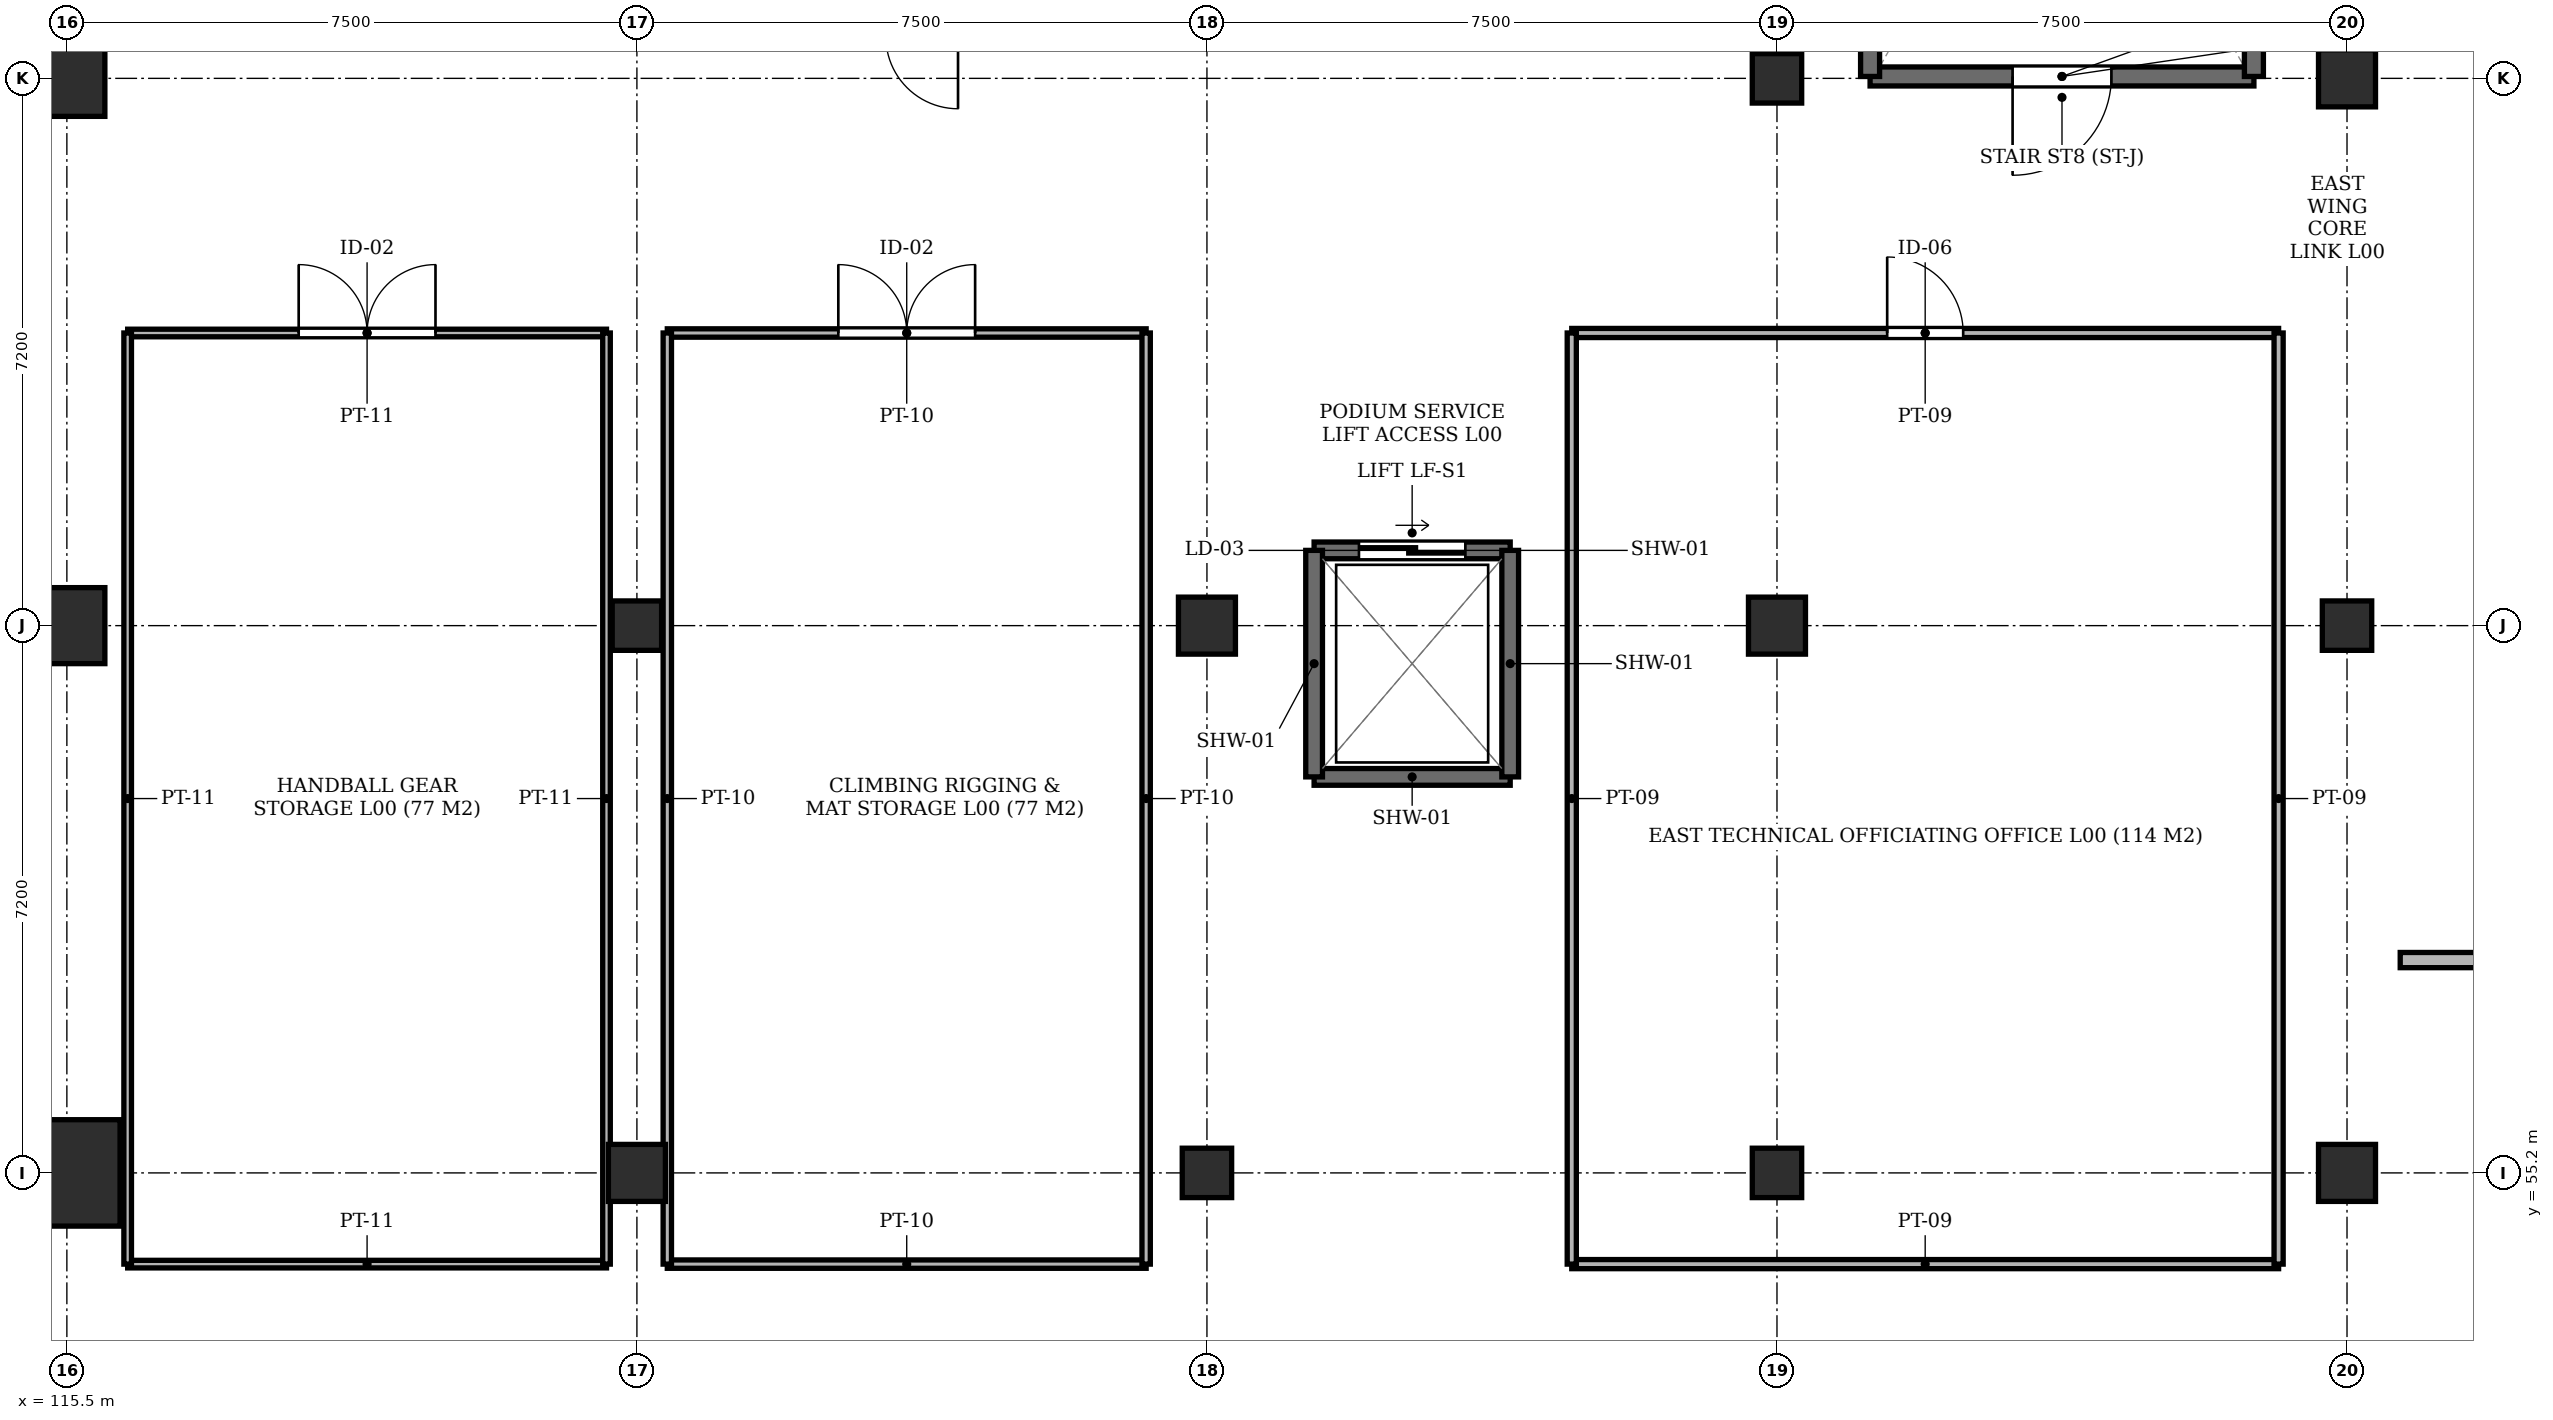
"""IFC4 building model, lengths in metres.
Left out: names, types, materials, properties, quantities, classifications, styles, units other than length and angle.
Written with IfcOpenShell. Run it as: python <this file> out.ifc"""

import sys

from ifc_helpers import new_model, si_unit, direction, frame, frame_2d, origin, origin_2d, place, context, subcontext, project, spatial, rectangle, extrude, element, fill, save


model = new_model("IFC4")
c1 = context("Model", 3, precision=1e-05, world=origin(), true_north=direction((0.0, 1.0)))
c2 = subcontext(c1, "Body", "Model", "MODEL_VIEW")
j1 = project(units=[si_unit("LENGTHUNIT", "METRE"), si_unit("PLANEANGLEUNIT", "RADIAN")], contexts=[c1])
p1 = place(None, origin())
s1 = spatial("IfcSite", under=j1, at=p1, CompositionType="ELEMENT")
p2 = place(p1, origin())
s2 = spatial("IfcBuilding", under=s1, at=p2, CompositionType="ELEMENT")
p3 = place(p2, origin())
s3 = spatial("IfcBuildingStorey", under=s2, at=p3, CompositionType="ELEMENT", Elevation=0.0)
p4 = place(p3, frame((115.5, 55.2, -0.35), z_axis=(0.0, 0.0, 1.0), x_axis=(1.0, 0.0, 0.0)))
e1 = element("IfcColumn", 1, at=p4, inside=s3, PredefinedType="COLUMN", context=c2, shape_type="SweptSolid", body=[
    extrude(rectangle(XDim=1.4, YDim=1.4, at=origin_2d()), origin(), (0.0, 0.0, 1.0), 4.65),
])
for number, where, z_axis, x_axis in (
    (2, (115.5, 62.4, -0.35), (0.0, 0.0, 1.0), (1.0, 0.0, 0.0)),
    (3, (115.5, 69.6, -0.35), (0.0, 0.0, 1.0), (1.0, 0.0, 0.0)),
):
    element("IfcColumn", number, at=place(p3, frame(where, z_axis=z_axis, x_axis=x_axis)), inside=s3, PredefinedType="COLUMN", context=c2, shape_type="SweptSolid", body=[
        extrude(rectangle(XDim=1.0, YDim=1.0, at=origin_2d()), origin(), (0.0, 0.0, 1.0), 4.65),
    ])
p5 = place(p3, frame((123.0, 55.2, -0.35), z_axis=(0.0, 0.0, 1.0), x_axis=(1.0, 0.0, 0.0)))
e4 = element("IfcColumn", 4, at=p5, inside=s3, PredefinedType="COLUMN", context=c2, shape_type="SweptSolid", body=[
    extrude(rectangle(XDim=0.75, YDim=0.75, at=origin_2d()), origin(), (0.0, 0.0, 1.0), 4.65),
])
for number, where, z_axis, x_axis in (
    (5, (123.0, 62.4, -0.35), (0.0, 0.0, 1.0), (1.0, 0.0, 0.0)),
    (6, (130.5, 55.2, -0.35), (0.0, 0.0, 1.0), (1.0, 0.0, 0.0)),
):
    element("IfcColumn", number, at=place(p3, frame(where, z_axis=z_axis, x_axis=x_axis)), inside=s3, PredefinedType="COLUMN", context=c2, shape_type="SweptSolid", body=[
        extrude(rectangle(XDim=0.65, YDim=0.65, at=origin_2d()), origin(), (0.0, 0.0, 1.0), 4.65),
    ])
p6 = place(p3, frame((130.5, 62.4, -0.35), z_axis=(0.0, 0.0, 1.0), x_axis=(1.0, 0.0, 0.0)))
e7 = element("IfcColumn", 7, at=p6, inside=s3, PredefinedType="COLUMN", context=c2, shape_type="SweptSolid", body=[
    extrude(rectangle(XDim=0.75, YDim=0.75, at=origin_2d()), origin(), (0.0, 0.0, 1.0), 4.65),
])
p7 = place(p3, frame((138.0, 55.2, -0.35), z_axis=(0.0, 0.0, 1.0), x_axis=(1.0, 0.0, 0.0)))
e8 = element("IfcColumn", 8, at=p7, inside=s3, PredefinedType="COLUMN", context=c2, shape_type="SweptSolid", body=[
    extrude(rectangle(XDim=0.65, YDim=0.65, at=origin_2d()), origin(), (0.0, 0.0, 1.0), 4.65),
])
p8 = place(p3, frame((138.0, 62.4, -0.35), z_axis=(0.0, 0.0, 1.0), x_axis=(1.0, 0.0, 0.0)))
e9 = element("IfcColumn", 9, at=p8, inside=s3, PredefinedType="COLUMN", context=c2, shape_type="SweptSolid", body=[
    extrude(rectangle(XDim=0.75, YDim=0.75, at=origin_2d()), origin(), (0.0, 0.0, 1.0), 4.65),
])
p9 = place(p3, frame((138.0, 69.6, -0.35), z_axis=(0.0, 0.0, 1.0), x_axis=(1.0, 0.0, 0.0)))
e10 = element("IfcColumn", 10, at=p9, inside=s3, PredefinedType="COLUMN", context=c2, shape_type="SweptSolid", body=[
    extrude(rectangle(XDim=0.65, YDim=0.65, at=origin_2d()), origin(), (0.0, 0.0, 1.0), 4.65),
])
p10 = place(p3, frame((145.5, 55.2, -0.35), z_axis=(0.0, 0.0, 1.0), x_axis=(1.0, 0.0, 0.0)))
e11 = element("IfcColumn", 11, at=p10, inside=s3, PredefinedType="COLUMN", context=c2, shape_type="SweptSolid", body=[
    extrude(rectangle(XDim=0.75, YDim=0.75, at=origin_2d()), origin(), (0.0, 0.0, 1.0), 4.65),
])
p11 = place(p3, frame((145.5, 62.4, -0.35), z_axis=(0.0, 0.0, 1.0), x_axis=(1.0, 0.0, 0.0)))
e12 = element("IfcColumn", 12, at=p11, inside=s3, PredefinedType="COLUMN", context=c2, shape_type="SweptSolid", body=[
    extrude(rectangle(XDim=0.65, YDim=0.65, at=origin_2d()), origin(), (0.0, 0.0, 1.0), 4.65),
])
p12 = place(p3, frame((145.5, 69.6, -0.35), z_axis=(0.0, 0.0, 1.0), x_axis=(1.0, 0.0, 0.0)))
e13 = element("IfcColumn", 13, at=p12, inside=s3, PredefinedType="COLUMN", context=c2, shape_type="SweptSolid", body=[
    extrude(rectangle(XDim=0.75, YDim=0.75, at=origin_2d()), origin(), (0.0, 0.0, 1.0), 4.65),
])
p13 = place(p3, frame((139.225, 69.625, 0.0), z_axis=(0.0, 0.0, 1.0), x_axis=(1.0, 0.0, 0.0)))
e14 = element("IfcWall", 14, at=p13, inside=s3, PredefinedType="SHEAR", context=c2, shape_type="SweptSolid", body=[
    extrude(rectangle(XDim=5.05, YDim=0.25, at=frame_2d((2.525, 0.0))), origin(), (0.0, 0.0, 1.0), 4.3),
])
p14 = place(p13, frame((1.875, 0.0, 0.0)))
e15 = element("IfcOpeningElement", 15, at=p14, cuts=e14, PredefinedType="OPENING", context=c2, shape_type="SweptSolid", body=[
    extrude(rectangle(XDim=1.3, YDim=2.2, at=frame_2d((0.65, 1.1))), frame((0.0, 0.137, 0.0), z_axis=(0.0, -1.0, 0.0), x_axis=(1.0, 0.0, 0.0)), (0.0, 0.0, 1.0), 0.274),
])
for number, where, z_axis, x_axis in (
    (16, (139.225, 78.325, 0.0), (0.0, 0.0, 1.0), (0.0, -1.0, 0.0)),
    (17, (144.275, 69.625, 0.0), (0.0, 0.0, 1.0), (0.0, 1.0, 0.0)),
):
    element("IfcWall", number, at=place(p3, frame(where, z_axis=z_axis, x_axis=x_axis)), inside=s3, PredefinedType="SHEAR", context=c2, shape_type="SweptSolid", body=[
        extrude(rectangle(XDim=8.7, YDim=0.25, at=frame_2d((4.35, 0.0))), origin(), (0.0, 0.0, 1.0), 4.3),
    ])
p15 = place(p3, frame((131.91, 60.41, 0.0), z_axis=(0.0, 0.0, 1.0), x_axis=(1.0, 0.0, 0.0)))
e18 = element("IfcWall", 18, at=p15, inside=s3, PredefinedType="SHEAR", context=c2, shape_type="SweptSolid", body=[
    extrude(rectangle(XDim=2.58, YDim=0.22, at=frame_2d((1.29, 0.0))), origin(), (0.0, 0.0, 1.0), 4.3),
])
p16 = place(p3, frame((134.49, 63.39, 0.0), z_axis=(0.0, 0.0, 1.0), x_axis=(-1.0, 0.0, 0.0)))
e19 = element("IfcWall", 19, at=p16, inside=s3, PredefinedType="SHEAR", context=c2, shape_type="SweptSolid", body=[
    extrude(rectangle(XDim=2.58, YDim=0.22, at=frame_2d((1.29, 0.0))), origin(), (0.0, 0.0, 1.0), 4.3),
])
p17 = place(p16, frame((0.59, 0.0, 0.0)))
e20 = element("IfcOpeningElement", 20, at=p17, cuts=e19, PredefinedType="OPENING", context=c2, shape_type="SweptSolid", body=[
    extrude(rectangle(XDim=1.4, YDim=2.3, at=frame_2d((0.7, 1.15))), frame((0.0, 0.122, 0.0), z_axis=(0.0, -1.0, 0.0), x_axis=(1.0, 0.0, 0.0)), (0.0, 0.0, 1.0), 0.244),
])
for number, where, z_axis, x_axis in (
    (21, (131.91, 63.39, 0.0), (0.0, 0.0, 1.0), (0.0, -1.0, 0.0)),
    (22, (134.49, 60.41, 0.0), (0.0, 0.0, 1.0), (0.0, 1.0, 0.0)),
):
    element("IfcWall", number, at=place(p3, frame(where, z_axis=z_axis, x_axis=x_axis)), inside=s3, PredefinedType="SHEAR", context=c2, shape_type="SweptSolid", body=[
        extrude(rectangle(XDim=2.98, YDim=0.22, at=frame_2d((1.49, 0.0))), origin(), (0.0, 0.0, 1.0), 4.3),
    ])
p18 = place(p3, frame((116.3, 54.0, 0.0), z_axis=(0.0, 0.0, 1.0), x_axis=(1.0, 0.0, 0.0)))
e23 = element("IfcWall", 23, at=p18, inside=s3, PredefinedType="PARTITIONING", context=c2, shape_type="SweptSolid", body=[
    extrude(rectangle(XDim=6.3, YDim=0.1, at=frame_2d((3.15, 0.0))), origin(), (0.0, 0.0, 1.0), 3.88),
])
p19 = place(p3, frame((116.3, 66.25, 0.0), z_axis=(0.0, 0.0, 1.0), x_axis=(1.0, 0.0, 0.0)))
e24 = element("IfcWall", 24, at=p19, inside=s3, PredefinedType="PARTITIONING", context=c2, shape_type="SweptSolid", body=[
    extrude(rectangle(XDim=6.3, YDim=0.1, at=frame_2d((3.15, 0.0))), origin(), (0.0, 0.0, 1.0), 3.88),
])
p20 = place(p19, frame((2.25, 0.0, 0.0)))
e25 = element("IfcOpeningElement", 25, at=p20, cuts=e24, PredefinedType="OPENING", context=c2, shape_type="SweptSolid", body=[
    extrude(rectangle(XDim=1.8, YDim=2.25, at=frame_2d((0.9, 1.125))), frame((0.0, 0.062, 0.0), z_axis=(0.0, -1.0, 0.0), x_axis=(1.0, 0.0, 0.0)), (0.0, 0.0, 1.0), 0.124),
])
for number, where, z_axis, x_axis in (
    (26, (116.3, 54.0, 0.0), (0.0, 0.0, 1.0), (0.0, 1.0, 0.0)),
    (27, (122.6, 54.0, 0.0), (0.0, 0.0, 1.0), (0.0, 1.0, 0.0)),
):
    element("IfcWall", number, at=place(p3, frame(where, z_axis=z_axis, x_axis=x_axis)), inside=s3, PredefinedType="PARTITIONING", context=c2, shape_type="SweptSolid", body=[
        extrude(rectangle(XDim=12.25, YDim=0.1, at=frame_2d((6.125, 0.0))), origin(), (0.0, 0.0, 1.0), 3.88),
    ])
p21 = place(p3, frame((123.4, 54.0, 0.0), z_axis=(0.0, 0.0, 1.0), x_axis=(1.0, 0.0, 0.0)))
e28 = element("IfcWall", 28, at=p21, inside=s3, PredefinedType="PARTITIONING", context=c2, shape_type="SweptSolid", body=[
    extrude(rectangle(XDim=6.3, YDim=0.11, at=frame_2d((3.15, 0.0))), origin(), (0.0, 0.0, 1.0), 3.88),
])
p22 = place(p3, frame((123.4, 66.25, 0.0), z_axis=(0.0, 0.0, 1.0), x_axis=(1.0, 0.0, 0.0)))
e29 = element("IfcWall", 29, at=p22, inside=s3, PredefinedType="PARTITIONING", context=c2, shape_type="SweptSolid", body=[
    extrude(rectangle(XDim=6.3, YDim=0.11, at=frame_2d((3.15, 0.0))), origin(), (0.0, 0.0, 1.0), 3.88),
])
p23 = place(p22, frame((2.25, 0.0, 0.0)))
e30 = element("IfcOpeningElement", 30, at=p23, cuts=e29, PredefinedType="OPENING", context=c2, shape_type="SweptSolid", body=[
    extrude(rectangle(XDim=1.8, YDim=2.25, at=frame_2d((0.9, 1.125))), frame((0.0, 0.067, 0.0), z_axis=(0.0, -1.0, 0.0), x_axis=(1.0, 0.0, 0.0)), (0.0, 0.0, 1.0), 0.134),
])
for number, where, z_axis, x_axis in (
    (31, (123.4, 54.0, 0.0), (0.0, 0.0, 1.0), (0.0, 1.0, 0.0)),
    (32, (129.7, 54.0, 0.0), (0.0, 0.0, 1.0), (0.0, 1.0, 0.0)),
):
    element("IfcWall", number, at=place(p3, frame(where, z_axis=z_axis, x_axis=x_axis)), inside=s3, PredefinedType="PARTITIONING", context=c2, shape_type="SweptSolid", body=[
        extrude(rectangle(XDim=12.25, YDim=0.11, at=frame_2d((6.125, 0.0))), origin(), (0.0, 0.0, 1.0), 3.88),
    ])
p24 = place(p3, frame((135.3, 54.0, 0.0), z_axis=(0.0, 0.0, 1.0), x_axis=(1.0, 0.0, 0.0)))
e33 = element("IfcWall", 33, at=p24, inside=s3, PredefinedType="PARTITIONING", context=c2, shape_type="SweptSolid", body=[
    extrude(rectangle(XDim=9.3, YDim=0.12, at=frame_2d((4.65, 0.0))), origin(), (0.0, 0.0, 1.0), 3.88),
])
p25 = place(p3, frame((135.3, 66.25, 0.0), z_axis=(0.0, 0.0, 1.0), x_axis=(1.0, 0.0, 0.0)))
e34 = element("IfcWall", 34, at=p25, inside=s3, PredefinedType="PARTITIONING", context=c2, shape_type="SweptSolid", body=[
    extrude(rectangle(XDim=9.3, YDim=0.12, at=frame_2d((4.65, 0.0))), origin(), (0.0, 0.0, 1.0), 3.88),
])
p26 = place(p25, frame((4.15, 0.0, 0.0)))
e35 = element("IfcOpeningElement", 35, at=p26, cuts=e34, PredefinedType="OPENING", context=c2, shape_type="SweptSolid", body=[
    extrude(rectangle(XDim=1.0, YDim=2.15, at=frame_2d((0.5, 1.075))), frame((0.0, 0.072, 0.0), z_axis=(0.0, -1.0, 0.0), x_axis=(1.0, 0.0, 0.0)), (0.0, 0.0, 1.0), 0.144),
])
for number, where, z_axis, x_axis in (
    (36, (135.3, 54.0, 0.0), (0.0, 0.0, 1.0), (0.0, 1.0, 0.0)),
    (37, (144.6, 54.0, 0.0), (0.0, 0.0, 1.0), (0.0, 1.0, 0.0)),
):
    element("IfcWall", number, at=place(p3, frame(where, z_axis=z_axis, x_axis=x_axis)), inside=s3, PredefinedType="PARTITIONING", context=c2, shape_type="SweptSolid", body=[
        extrude(rectangle(XDim=12.25, YDim=0.12, at=frame_2d((6.125, 0.0))), origin(), (0.0, 0.0, 1.0), 3.88),
    ])
p27 = place(p3, frame((146.2, 58.0, 0.0), z_axis=(0.0, 0.0, 1.0), x_axis=(1.0, 0.0, 0.0)))
e38 = element("IfcWall", 38, at=p27, inside=s3, PredefinedType="PARTITIONING", context=c2, shape_type="SweptSolid", body=[
    extrude(rectangle(XDim=6.0, YDim=0.2, at=frame_2d((3.0, 0.0))), origin(), (0.0, 0.0, 1.0), 3.4),
])
p28 = place(p27, frame((1.6, 0.0, 0.0)))
e39 = element("IfcOpeningElement", 39, at=p28, cuts=e38, PredefinedType="OPENING", context=c2, shape_type="SweptSolid", body=[
    extrude(rectangle(XDim=2.8, YDim=2.5, at=frame_2d((1.4, 1.25))), frame((0.0, 0.112, 0.0), z_axis=(0.0, -1.0, 0.0), x_axis=(1.0, 0.0, 0.0)), (0.0, 0.0, 1.0), 0.224),
])
p29 = place(p14, frame((1.3, 0.0, 0.0), z_axis=(0.0, 0.0, 1.0), x_axis=(-1.0, 0.0, 0.0)))
e40 = element("IfcDoor", 40, at=p29, inside=s3, OperationType="SINGLE_SWING_LEFT", PredefinedType="DOOR", context=c2, shape_type="SweptSolid", body=[
    extrude(rectangle(XDim=1.3, YDim=2.2, at=frame_2d((0.65, 1.1))), frame((0.0, 0.025, 0.0), z_axis=(0.0, -1.0, 0.0), x_axis=(1.0, 0.0, 0.0)), (0.0, 0.0, 1.0), 0.05),
])
fill(e15, e40)
p30 = place(p17, origin())
e41 = element("IfcDoor", 41, at=p30, inside=s3, OperationType="SLIDING_TO_LEFT", PredefinedType="DOOR", context=c2, shape_type="SweptSolid", body=[
    extrude(rectangle(XDim=1.4, YDim=2.3, at=frame_2d((0.7, 1.15))), frame((0.0, 0.025, 0.0), z_axis=(0.0, -1.0, 0.0), x_axis=(1.0, 0.0, 0.0)), (0.0, 0.0, 1.0), 0.05),
])
fill(e20, e41)
p31 = place(p20, origin())
e42 = element("IfcDoor", 42, at=p31, inside=s3, OperationType="DOUBLE_DOOR_SINGLE_SWING", PredefinedType="DOOR", context=c2, shape_type="SweptSolid", body=[
    extrude(rectangle(XDim=1.8, YDim=2.25, at=frame_2d((0.9, 1.125))), frame((0.0, 0.025, 0.0), z_axis=(0.0, -1.0, 0.0), x_axis=(1.0, 0.0, 0.0)), (0.0, 0.0, 1.0), 0.05),
])
fill(e25, e42)
p32 = place(p23, origin())
e43 = element("IfcDoor", 43, at=p32, inside=s3, OperationType="DOUBLE_DOOR_SINGLE_SWING", PredefinedType="DOOR", context=c2, shape_type="SweptSolid", body=[
    extrude(rectangle(XDim=1.8, YDim=2.25, at=frame_2d((0.9, 1.125))), frame((0.0, 0.025, 0.0), z_axis=(0.0, -1.0, 0.0), x_axis=(1.0, 0.0, 0.0)), (0.0, 0.0, 1.0), 0.05),
])
fill(e30, e43)
p33 = place(p26, origin())
e44 = element("IfcDoor", 44, at=p33, inside=s3, OperationType="SINGLE_SWING_LEFT", PredefinedType="DOOR", context=c2, shape_type="SweptSolid", body=[
    extrude(rectangle(XDim=1.0, YDim=2.15, at=frame_2d((0.5, 1.075))), frame((0.0, 0.025, 0.0), z_axis=(0.0, -1.0, 0.0), x_axis=(1.0, 0.0, 0.0)), (0.0, 0.0, 1.0), 0.05),
])
fill(e35, e44)
save(model, sys.argv[1])
